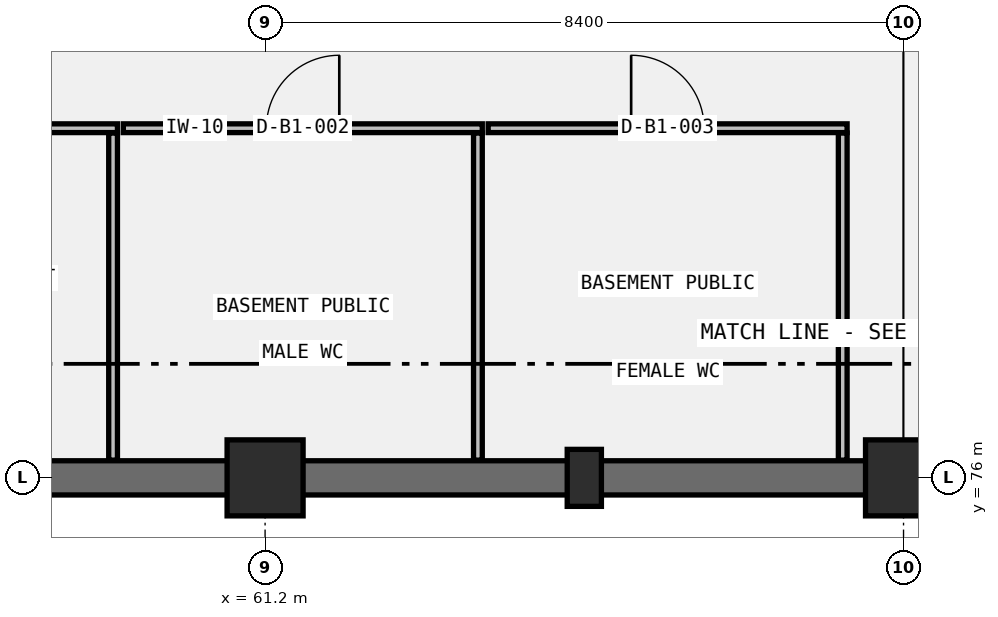
"""IFC4 building model, lengths in metres.
Left out: names, types, materials, properties, quantities, classifications, styles, units other than length and angle.
Written with IfcOpenShell. Run it as: python <this file> out.ifc"""

import sys

from ifc_helpers import new_model, si_unit, direction, frame, frame_2d, origin, origin_2d, place, context, subcontext, project, spatial, rectangle, extrude, element, fill, save


model = new_model("IFC4")
c1 = context("Model", 3, precision=1e-05, world=origin(), true_north=direction((0.0, 1.0)))
c2 = subcontext(c1, "Body", "Model", "MODEL_VIEW")
j1 = project(units=[si_unit("LENGTHUNIT", "METRE"), si_unit("PLANEANGLEUNIT", "RADIAN")], contexts=[c1])
p1 = place(None, origin())
s1 = spatial("IfcSite", under=j1, at=p1, CompositionType="ELEMENT")
p2 = place(p1, origin())
s2 = spatial("IfcBuilding", under=s1, at=p2, CompositionType="ELEMENT")
p3 = place(p2, frame((0.0, 0.0, -5.4)))
s3 = spatial("IfcBuildingStorey", under=s2, at=p3, CompositionType="ELEMENT", Elevation=-5.4)
p4 = place(p3, frame((61.2, 76.0, 0.0), z_axis=(0.0, 0.0, 1.0), x_axis=(1.0, 0.0, 0.0)))
e1 = element("IfcColumn", 1, at=p4, inside=s3, PredefinedType="COLUMN", context=c2, shape_type="SweptSolid", body=[
    extrude(rectangle(XDim=1.0, YDim=1.0, at=origin_2d()), origin(), (0.0, 0.0, 1.0), 5.4),
])
p5 = place(p3, frame((65.4, 76.0, 0.0), z_axis=(0.0, 0.0, 1.0), x_axis=(1.0, 0.0, 0.0)))
e2 = element("IfcColumn", 2, at=p5, inside=s3, PredefinedType="PILASTER", context=c2, shape_type="SweptSolid", body=[
    extrude(rectangle(XDim=0.45, YDim=0.75, at=origin_2d()), origin(), (0.0, 0.0, 1.0), 5.4),
])
p6 = place(p3, frame((69.6, 76.0, 0.0), z_axis=(0.0, 0.0, 1.0), x_axis=(1.0, 0.0, 0.0)))
e3 = element("IfcColumn", 3, at=p6, inside=s3, PredefinedType="COLUMN", context=c2, shape_type="SweptSolid", body=[
    extrude(rectangle(XDim=1.0, YDim=1.0, at=origin_2d()), origin(), (0.0, 0.0, 1.0), 5.4),
])
p7 = place(p3, frame((44.7, 76.0, 0.0), z_axis=(0.0, 0.0, 1.0), x_axis=(1.0, 0.0, 0.0)))
e4 = element("IfcWall", 4, at=p7, inside=s3, PredefinedType="SHEAR", context=c2, shape_type="SweptSolid", body=[
    extrude(rectangle(XDim=67.4, YDim=0.45, at=frame_2d((33.7, 0.0))), origin(), (0.0, 0.0, 1.0), 5.1),
])
p8 = place(p3, frame((55.942, 80.6, 0.0), z_axis=(0.0, 0.0, 1.0), x_axis=(1.0, 0.0, 0.0)))
e5 = element("IfcWall", 5, at=p8, inside=s3, PredefinedType="PARTITIONING", context=c2, shape_type="SweptSolid", body=[
    extrude(rectangle(XDim=3.315, YDim=0.115, at=frame_2d((1.658, 0.0))), origin(), (0.0, 0.0, 1.0), 5.1),
])
p9 = place(p8, frame((1.177, 0.0, 0.0)))
e6 = element("IfcOpeningElement", 6, at=p9, cuts=e5, PredefinedType="OPENING", context=c2, shape_type="SweptSolid", body=[
    extrude(rectangle(XDim=0.96, YDim=2.08, at=frame_2d((0.48, 1.04))), frame((0.0, 0.067, 0.0), z_axis=(0.0, -1.0, 0.0), x_axis=(1.0, 0.0, 0.0)), (0.0, 0.0, 1.0), 0.135),
])
p10 = place(p3, frame((59.2, 76.233, 0.0), z_axis=(0.0, 0.0, 1.0), x_axis=(0.0, 1.0, 0.0)))
e7 = element("IfcWall", 7, at=p10, inside=s3, PredefinedType="PARTITIONING", context=c2, shape_type="SweptSolid", body=[
    extrude(rectangle(XDim=4.304, YDim=0.115, at=frame_2d((2.152, 0.0))), origin(), (0.0, 0.0, 1.0), 5.1),
])
p11 = place(p3, frame((59.335, 80.6, 0.0), z_axis=(0.0, 0.0, 1.0), x_axis=(1.0, 0.0, 0.0)))
e8 = element("IfcWall", 8, at=p11, inside=s3, PredefinedType="PARTITIONING", context=c2, shape_type="SweptSolid", body=[
    extrude(rectangle(XDim=4.723, YDim=0.115, at=frame_2d((2.361, 0.0))), origin(), (0.0, 0.0, 1.0), 4.49),
])
p12 = place(p11, frame((1.881, 0.0, 0.0)))
e9 = element("IfcOpeningElement", 9, at=p12, cuts=e8, PredefinedType="OPENING", context=c2, shape_type="SweptSolid", body=[
    extrude(rectangle(XDim=0.96, YDim=2.08, at=frame_2d((0.48, 1.04))), frame((0.0, 0.067, 0.0), z_axis=(0.0, -1.0, 0.0), x_axis=(1.0, 0.0, 0.0)), (0.0, 0.0, 1.0), 0.135),
])
p13 = place(p3, frame((64.0, 76.233, 0.0), z_axis=(0.0, 0.0, 1.0), x_axis=(0.0, 1.0, 0.0)))
e10 = element("IfcWall", 10, at=p13, inside=s3, PredefinedType="PARTITIONING", context=c2, shape_type="SweptSolid", body=[
    extrude(rectangle(XDim=4.304, YDim=0.115, at=frame_2d((2.152, 0.0))), origin(), (0.0, 0.0, 1.0), 5.1),
])
p14 = place(p3, frame((64.135, 80.6, 0.0), z_axis=(0.0, 0.0, 1.0), x_axis=(1.0, 0.0, 0.0)))
e11 = element("IfcWall", 11, at=p14, inside=s3, PredefinedType="PARTITIONING", context=c2, shape_type="SweptSolid", body=[
    extrude(rectangle(XDim=4.722, YDim=0.115, at=frame_2d((2.361, 0.0))), origin(), (0.0, 0.0, 1.0), 5.1),
])
p15 = place(p14, frame((1.881, 0.0, 0.0)))
e12 = element("IfcOpeningElement", 12, at=p15, cuts=e11, PredefinedType="OPENING", context=c2, shape_type="SweptSolid", body=[
    extrude(rectangle(XDim=0.96, YDim=2.08, at=frame_2d((0.48, 1.04))), frame((0.0, 0.067, 0.0), z_axis=(0.0, -1.0, 0.0), x_axis=(1.0, 0.0, 0.0)), (0.0, 0.0, 1.0), 0.135),
])
p16 = place(p3, frame((68.8, 76.233, 0.0), z_axis=(0.0, 0.0, 1.0), x_axis=(0.0, 1.0, 0.0)))
e13 = element("IfcWall", 13, at=p16, inside=s3, PredefinedType="PARTITIONING", context=c2, shape_type="SweptSolid", body=[
    extrude(rectangle(XDim=4.304, YDim=0.115, at=frame_2d((2.152, 0.0))), origin(), (0.0, 0.0, 1.0), 5.1),
])
p17 = place(p12, origin())
e14 = element("IfcDoor", 14, at=p17, inside=s3, OperationType="SINGLE_SWING_RIGHT", PredefinedType="DOOR", context=c2, shape_type="SweptSolid", body=[
    extrude(rectangle(XDim=0.96, YDim=2.08, at=frame_2d((0.48, 1.04))), frame((0.0, 0.025, 0.0), z_axis=(0.0, -1.0, 0.0), x_axis=(1.0, 0.0, 0.0)), (0.0, 0.0, 1.0), 0.05),
])
fill(e9, e14)
p18 = place(p15, origin())
e15 = element("IfcDoor", 15, at=p18, inside=s3, OperationType="SINGLE_SWING_LEFT", PredefinedType="DOOR", context=c2, shape_type="SweptSolid", body=[
    extrude(rectangle(XDim=0.96, YDim=2.08, at=frame_2d((0.48, 1.04))), frame((0.0, 0.025, 0.0), z_axis=(0.0, -1.0, 0.0), x_axis=(1.0, 0.0, 0.0)), (0.0, 0.0, 1.0), 0.05),
])
fill(e12, e15)
save(model, sys.argv[1])
